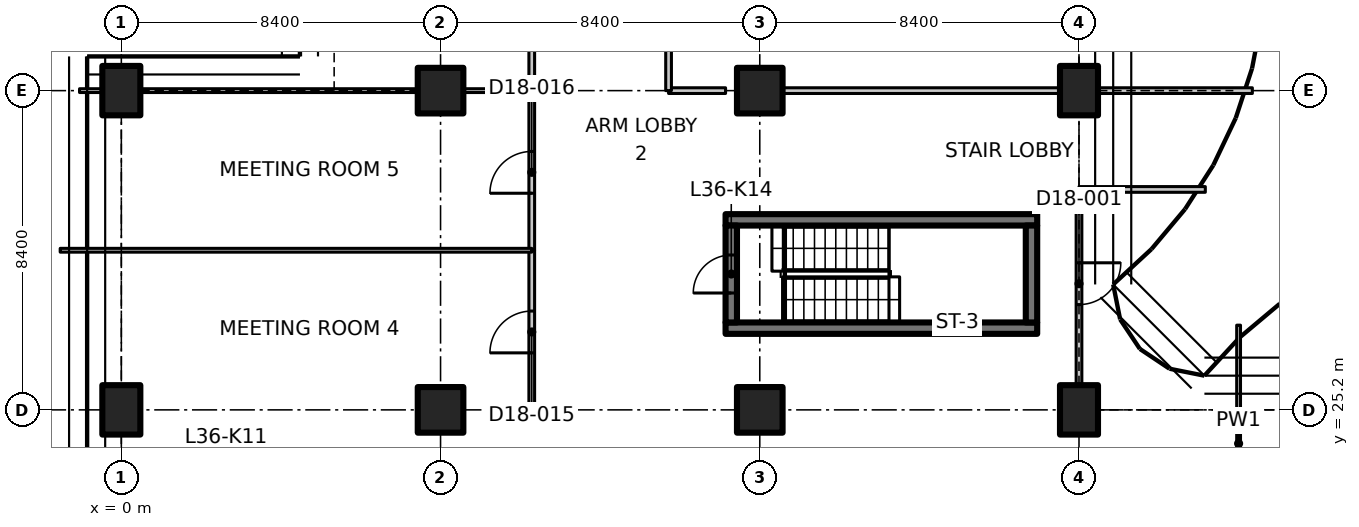
"""IFC4 building model, lengths in metres.
Left out: names, types, materials, properties, quantities, classifications, styles, units other than length and angle.
Written with IfcOpenShell. Run it as: python <this file> out.ifc"""

import sys

from ifc_helpers import new_model, si_unit, direction, frame, frame_2d, origin, origin_2d, place, context, subcontext, project, spatial, polyline, rectangle, outline, extrude, element, fill, save


model = new_model("IFC4")
c1 = context("Model", 3, precision=1e-05, world=origin(), true_north=direction((0.0, 1.0)))
c2 = subcontext(c1, "Body", "Model", "MODEL_VIEW")
j1 = project(units=[si_unit("LENGTHUNIT", "METRE"), si_unit("PLANEANGLEUNIT", "RADIAN")], contexts=[c1])
p1 = place(None, origin())
s1 = spatial("IfcSite", under=j1, at=p1, CompositionType="ELEMENT")
p2 = place(p1, origin())
s2 = spatial("IfcBuilding", under=s1, at=p2, CompositionType="ELEMENT")
p3 = place(p2, frame((0.0, 0.0, 145.7)))
s3 = spatial("IfcBuildingStorey", under=s2, at=p3, CompositionType="ELEMENT", Elevation=145.7)
for number, where, z_axis, x_axis in (
    (1, (0.0, 25.2, 0.0), (0.0, 0.0, 1.0), (1.0, 0.0, 0.0)),
    (2, (0.0, 33.6, 0.0), (0.0, 0.0, 1.0), (1.0, 0.0, 0.0)),
):
    element("IfcColumn", number, at=place(p3, frame(where, z_axis=z_axis, x_axis=x_axis)), inside=s3, PredefinedType="COLUMN", context=c2, shape_type="SweptSolid", body=[
        extrude(rectangle(XDim=1.0, YDim=1.3, at=origin_2d()), origin(), (0.0, 0.0, 1.0), 3.35),
    ])
for number, where, z_axis, x_axis in (
    (3, (8.4, 25.2, 0.0), (0.0, 0.0, 1.0), (1.0, 0.0, 0.0)),
    (4, (8.4, 33.6, 0.0), (0.0, 0.0, 1.0), (1.0, 0.0, 0.0)),
    (5, (16.8, 25.2, 0.0), (0.0, 0.0, 1.0), (1.0, 0.0, 0.0)),
    (6, (16.8, 33.6, 0.0), (0.0, 0.0, 1.0), (1.0, 0.0, 0.0)),
):
    element("IfcColumn", number, at=place(p3, frame(where, z_axis=z_axis, x_axis=x_axis)), inside=s3, PredefinedType="COLUMN", context=c2, shape_type="SweptSolid", body=[
        extrude(rectangle(XDim=1.2, YDim=1.2, at=origin_2d()), origin(), (0.0, 0.0, 1.0), 3.35),
    ])
for number, where, z_axis, x_axis in (
    (7, (25.2, 25.2, 0.0), (0.0, 0.0, 1.0), (1.0, 0.0, 0.0)),
    (8, (25.2, 33.6, 0.0), (0.0, 0.0, 1.0), (1.0, 0.0, 0.0)),
):
    element("IfcColumn", number, at=place(p3, frame(where, z_axis=z_axis, x_axis=x_axis)), inside=s3, PredefinedType="COLUMN", context=c2, shape_type="SweptSolid", body=[
        extrude(rectangle(XDim=1.0, YDim=1.3, at=origin_2d()), origin(), (0.0, 0.0, 1.0), 3.35),
    ])
for number, where, z_axis, x_axis in (
    (9, (15.9, 27.35, 0.0), (0.0, 0.0, 1.0), (1.0, 0.0, 0.0)),
    (10, (15.9, 30.2, 0.0), (0.0, 0.0, 1.0), (1.0, 0.0, 0.0)),
):
    element("IfcWall", number, at=place(p3, frame(where, z_axis=z_axis, x_axis=x_axis)), inside=s3, PredefinedType="SHEAR", context=c2, shape_type="SweptSolid", body=[
        extrude(rectangle(XDim=8.2, YDim=0.3, at=frame_2d((4.1, 0.0))), origin(), (0.0, 0.0, 1.0), 3.35),
    ])
p4 = place(p3, frame((16.05, 27.5, 0.0), z_axis=(0.0, 0.0, 1.0), x_axis=(0.0, 1.0, 0.0)))
e11 = element("IfcWall", 11, at=p4, inside=s3, PredefinedType="SHEAR", context=c2, shape_type="SweptSolid", body=[
    extrude(rectangle(XDim=2.55, YDim=0.3, at=frame_2d((1.275, 0.0))), origin(), (0.0, 0.0, 1.0), 3.35),
])
p5 = place(p4, frame((0.775, 0.0, 0.0)))
e12 = element("IfcOpeningElement", 12, at=p5, cuts=e11, PredefinedType="OPENING", context=c2, shape_type="SweptSolid", body=[
    extrude(rectangle(XDim=1.0, YDim=2.1, at=frame_2d((0.5, 1.05))), frame((0.0, 0.16, 0.0), z_axis=(0.0, -1.0, 0.0), x_axis=(1.0, 0.0, 0.0)), (0.0, 0.0, 1.0), 0.32),
])
p6 = place(p3, frame((23.95, 27.5, 0.0), z_axis=(0.0, 0.0, 1.0), x_axis=(0.0, 1.0, 0.0)))
e13 = element("IfcWall", 13, at=p6, inside=s3, PredefinedType="SHEAR", context=c2, shape_type="SweptSolid", body=[
    extrude(rectangle(XDim=2.55, YDim=0.3, at=frame_2d((1.275, 0.0))), origin(), (0.0, 0.0, 1.0), 3.35),
])
p7 = place(p3, frame((29.4, 27.429, 0.0), z_axis=(0.0, 0.0, 1.0), x_axis=(0.0, -1.0, 0.0)))
e14 = element("IfcWall", 14, at=p7, inside=s3, PredefinedType="PARTITIONING", context=c2, shape_type="SweptSolid", body=[
    extrude(outline(polyline([(0.0, 0.0), (6.229, 0.0), (6.229, 3.33), (2.679, 3.33), (2.677, 2.98), (1.781, 2.98), (1.779, 3.33), (0.154, 3.33), (0.0, 3.33), (0.0, 0.0)])), frame((0.0, 0.05, 0.0), z_axis=(0.0, -1.0, 0.0), x_axis=(1.0, 0.0, 0.0)), (0.0, 0.0, 1.0), 0.1),
])
p8 = place(p3, frame((25.2, 31.0, 0.0), z_axis=(0.0, 0.0, 1.0), x_axis=(0.0, -1.0, 0.0)))
e15 = element("IfcWall", 15, at=p8, inside=s3, PredefinedType="PARTITIONING", context=c2, shape_type="SweptSolid", body=[
    extrude(outline(polyline([(0.0, 0.0), (5.13, 0.0), (5.13, 2.98), (0.0, 2.98), (0.0, 0.0)])), frame((0.0, 0.075, 0.0), z_axis=(0.0, -1.0, 0.0), x_axis=(1.0, 0.0, 0.0)), (0.0, 0.0, 1.0), 0.15),
])
p9 = place(p8, frame((1.93, 0.0, 0.0)))
e16 = element("IfcOpeningElement", 16, at=p9, cuts=e15, PredefinedType="OPENING", context=c2, shape_type="SweptSolid", body=[
    extrude(rectangle(XDim=1.1, YDim=2.1, at=frame_2d((0.55, 1.05))), frame((0.0, 0.085, 0.0), z_axis=(0.0, -1.0, 0.0), x_axis=(1.0, 0.0, 0.0)), (0.0, 0.0, 1.0), 0.17),
])
p10 = place(p3, frame((25.2, 31.0, 0.0), z_axis=(0.0, 0.0, 1.0), x_axis=(1.0, 0.0, 0.0)))
e17 = element("IfcWall", 17, at=p10, inside=s3, PredefinedType="PARTITIONING", context=c2, shape_type="SweptSolid", body=[
    extrude(rectangle(XDim=3.324, YDim=0.15, at=frame_2d((1.662, 0.0))), origin(), (0.0, 0.0, 1.0), 2.98),
])
p11 = place(p3, frame((10.8, 25.2, 0.0), z_axis=(0.0, 0.0, 1.0), x_axis=(0.0, 1.0, 0.0)))
e18 = element("IfcWall", 18, at=p11, inside=s3, PredefinedType="PARTITIONING", context=c2, shape_type="SweptSolid", body=[
    extrude(rectangle(XDim=4.2, YDim=0.15, at=frame_2d((2.1, 0.0))), origin(), (0.0, 0.0, 1.0), 3.33),
])
p12 = place(p11, frame((1.5, 0.0, 0.0)))
e19 = element("IfcOpeningElement", 19, at=p12, cuts=e18, PredefinedType="OPENING", context=c2, shape_type="SweptSolid", body=[
    extrude(rectangle(XDim=1.1, YDim=2.1, at=frame_2d((0.55, 1.05))), frame((0.0, 0.085, 0.0), z_axis=(0.0, -1.0, 0.0), x_axis=(1.0, 0.0, 0.0)), (0.0, 0.0, 1.0), 0.17),
])
p13 = place(p3, frame((10.8, 29.4, 0.0), z_axis=(0.0, 0.0, 1.0), x_axis=(0.0, 1.0, 0.0)))
e20 = element("IfcWall", 20, at=p13, inside=s3, PredefinedType="PARTITIONING", context=c2, shape_type="SweptSolid", body=[
    extrude(rectangle(XDim=4.2, YDim=0.15, at=frame_2d((2.1, 0.0))), origin(), (0.0, 0.0, 1.0), 3.33),
])
p14 = place(p13, frame((1.5, 0.0, 0.0)))
e21 = element("IfcOpeningElement", 21, at=p14, cuts=e20, PredefinedType="OPENING", context=c2, shape_type="SweptSolid", body=[
    extrude(rectangle(XDim=1.1, YDim=2.1, at=frame_2d((0.55, 1.05))), frame((0.0, 0.085, 0.0), z_axis=(0.0, -1.0, 0.0), x_axis=(1.0, 0.0, 0.0)), (0.0, 0.0, 1.0), 0.17),
])
p15 = place(p3, frame((14.4, 33.6, 0.0), z_axis=(0.0, 0.0, 1.0), x_axis=(1.0, 0.0, 0.0)))
e22 = element("IfcWall", 22, at=p15, inside=s3, PredefinedType="PARTITIONING", context=c2, shape_type="SweptSolid", body=[
    extrude(rectangle(XDim=1.5, YDim=0.15, at=frame_2d((0.75, 0.0))), origin(), (0.0, 0.0, 1.0), 3.33),
])
p16 = place(p3, frame((17.42, 33.6, 0.0), z_axis=(0.0, 0.0, 1.0), x_axis=(1.0, 0.0, 0.0)))
e23 = element("IfcWall", 23, at=p16, inside=s3, PredefinedType="PARTITIONING", context=c2, shape_type="SweptSolid", body=[
    extrude(rectangle(XDim=7.26, YDim=0.15, at=frame_2d((3.63, 0.0))), origin(), (0.0, 0.0, 1.0), 3.33),
])
p17 = place(p3, frame((25.72, 33.6, 0.0), z_axis=(0.0, 0.0, 1.0), x_axis=(1.0, 0.0, 0.0)))
e24 = element("IfcWall", 24, at=p17, inside=s3, PredefinedType="PARTITIONING", context=c2, shape_type="SweptSolid", body=[
    extrude(rectangle(XDim=4.042, YDim=0.15, at=frame_2d((2.021, 0.0))), origin(), (0.0, 0.0, 1.0), 2.98),
])
p18 = place(p3, frame((10.8, 33.6, 0.0), z_axis=(0.0, 0.0, 1.0), x_axis=(0.0, 1.0, 0.0)))
e25 = element("IfcWall", 25, at=p18, inside=s3, PredefinedType="PARTITIONING", context=c2, shape_type="SweptSolid", body=[
    extrude(rectangle(XDim=8.4, YDim=0.15, at=frame_2d((4.2, 0.0))), origin(), (0.0, 0.0, 1.0), 3.33),
])
p19 = place(p18, frame((3.6, 0.0, 0.0)))
e26 = element("IfcOpeningElement", 26, at=p19, cuts=e25, PredefinedType="OPENING", context=c2, shape_type="SweptSolid", body=[
    extrude(rectangle(XDim=1.1, YDim=2.1, at=frame_2d((0.55, 1.05))), frame((0.0, 0.085, 0.0), z_axis=(0.0, -1.0, 0.0), x_axis=(1.0, 0.0, 0.0)), (0.0, 0.0, 1.0), 0.17),
])
p20 = place(p3, frame((14.4, 42.0, 0.0), z_axis=(0.0, 0.0, 1.0), x_axis=(0.0, -1.0, 0.0)))
e27 = element("IfcWall", 27, at=p20, inside=s3, PredefinedType="PARTITIONING", context=c2, shape_type="SweptSolid", body=[
    extrude(rectangle(XDim=8.4, YDim=0.15, at=frame_2d((4.2, 0.0))), origin(), (0.0, 0.0, 1.0), 3.33),
])
p21 = place(p3, frame((-1.609, 29.4, 0.0), z_axis=(0.0, 0.0, 1.0), x_axis=(1.0, 0.0, 0.0)))
e28 = element("IfcWall", 28, at=p21, inside=s3, PredefinedType="PARTITIONING", context=c2, shape_type="SweptSolid", body=[
    extrude(outline(polyline([(0.0, 0.0), (12.409, 0.0), (12.409, 3.33), (2.059, 3.33), (2.057, 2.98), (1.161, 2.98), (1.159, 3.33), (0.509, 3.33), (0.0, 3.33), (0.0, 0.0)])), frame((0.0, 0.05, 0.0), z_axis=(0.0, -1.0, 0.0), x_axis=(1.0, 0.0, 0.0)), (0.0, 0.0, 1.0), 0.1),
])
p22 = place(p3, frame((-1.1, 33.6, 0.0), z_axis=(0.0, 0.0, 1.0), x_axis=(1.0, 0.0, 0.0)))
e29 = element("IfcWall", 29, at=p22, inside=s3, PredefinedType="PARTITIONING", context=c2, shape_type="SweptSolid", body=[
    extrude(rectangle(XDim=0.58, YDim=0.1, at=frame_2d((0.29, 0.0))), origin(), (0.0, 0.0, 1.0), 3.33),
])
p23 = place(p3, frame((0.52, 33.6, 0.0), z_axis=(0.0, 0.0, 1.0), x_axis=(1.0, 0.0, 0.0)))
e30 = element("IfcWall", 30, at=p23, inside=s3, PredefinedType="PARTITIONING", context=c2, shape_type="SweptSolid", body=[
    extrude(outline(polyline([(0.0, 0.0), (7.26, 0.0), (7.26, 2.98), (0.0, 2.98), (0.0, 0.0)])), frame((0.0, 0.05, 0.0), z_axis=(0.0, -1.0, 0.0), x_axis=(1.0, 0.0, 0.0)), (0.0, 0.0, 1.0), 0.1),
])
p24 = place(p3, frame((9.02, 33.6, 0.0), z_axis=(0.0, 0.0, 1.0), x_axis=(1.0, 0.0, 0.0)))
e31 = element("IfcWall", 31, at=p24, inside=s3, PredefinedType="PARTITIONING", context=c2, shape_type="SweptSolid", body=[
    extrude(rectangle(XDim=1.78, YDim=0.1, at=frame_2d((0.89, 0.0))), origin(), (0.0, 0.0, 1.0), 3.33),
])
p25 = place(p5, origin())
e32 = element("IfcDoor", 32, at=p25, inside=s3, OperationType="SINGLE_SWING_RIGHT", PredefinedType="DOOR", context=c2, shape_type="SweptSolid", body=[
    extrude(rectangle(XDim=1.0, YDim=2.1, at=frame_2d((0.5, 1.05))), frame((0.0, 0.025, 0.0), z_axis=(0.0, -1.0, 0.0), x_axis=(1.0, 0.0, 0.0)), (0.0, 0.0, 1.0), 0.05),
])
fill(e12, e32)
p26 = place(p9, origin())
e33 = element("IfcDoor", 33, at=p26, inside=s3, OperationType="SINGLE_SWING_RIGHT", PredefinedType="DOOR", context=c2, shape_type="SweptSolid", body=[
    extrude(rectangle(XDim=1.1, YDim=2.1, at=frame_2d((0.55, 1.05))), frame((0.0, 0.025, 0.0), z_axis=(0.0, -1.0, 0.0), x_axis=(1.0, 0.0, 0.0)), (0.0, 0.0, 1.0), 0.05),
])
fill(e16, e33)
p27 = place(p12, origin())
e34 = element("IfcDoor", 34, at=p27, inside=s3, OperationType="SINGLE_SWING_LEFT", PredefinedType="DOOR", context=c2, shape_type="SweptSolid", body=[
    extrude(rectangle(XDim=1.1, YDim=2.1, at=frame_2d((0.55, 1.05))), frame((0.0, 0.025, 0.0), z_axis=(0.0, -1.0, 0.0), x_axis=(1.0, 0.0, 0.0)), (0.0, 0.0, 1.0), 0.05),
])
fill(e19, e34)
p28 = place(p14, origin())
e35 = element("IfcDoor", 35, at=p28, inside=s3, OperationType="SINGLE_SWING_LEFT", PredefinedType="DOOR", context=c2, shape_type="SweptSolid", body=[
    extrude(rectangle(XDim=1.1, YDim=2.1, at=frame_2d((0.55, 1.05))), frame((0.0, 0.025, 0.0), z_axis=(0.0, -1.0, 0.0), x_axis=(1.0, 0.0, 0.0)), (0.0, 0.0, 1.0), 0.05),
])
fill(e21, e35)
save(model, sys.argv[1])
